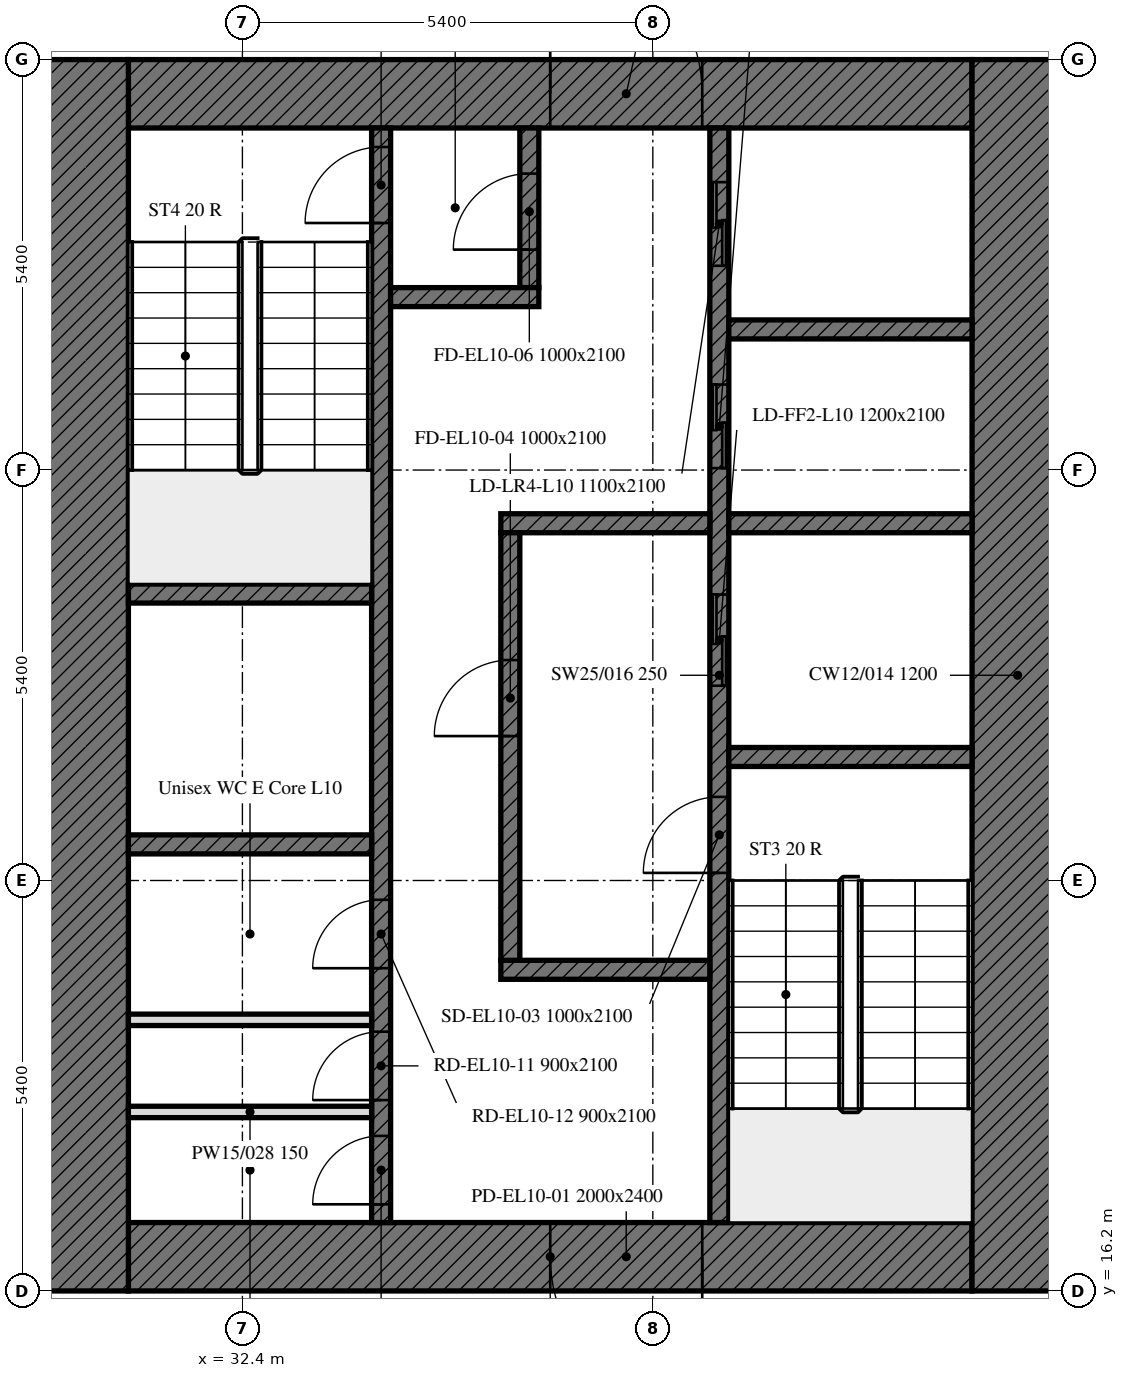
"""IFC4 building model, lengths in metres.
Left out: names, types, materials, properties, quantities, classifications, styles, units other than length and angle.
Written with IfcOpenShell. Run it as: python <this file> out.ifc"""

import sys

from ifc_helpers import new_model, si_unit, direction, frame, frame_2d, origin, place, context, subcontext, project, spatial, rectangle, extrude, element, fill, save


model = new_model("IFC4")
c1 = context("Model", 3, precision=1e-05, world=origin(), true_north=direction((0.0, 1.0)))
c2 = subcontext(c1, "Body", "Model", "MODEL_VIEW")
j1 = project(units=[si_unit("LENGTHUNIT", "METRE"), si_unit("PLANEANGLEUNIT", "RADIAN")], contexts=[c1])
p1 = place(None, origin())
s1 = spatial("IfcSite", under=j1, at=p1, CompositionType="ELEMENT")
p2 = place(p1, origin())
s2 = spatial("IfcBuilding", under=s1, at=p2, CompositionType="ELEMENT")
p3 = place(p2, frame((0.0, 0.0, 48.8)))
s3 = spatial("IfcBuildingStorey", under=s2, at=p3, CompositionType="ELEMENT", Elevation=48.8)
p4 = place(p3, frame((42.0, 16.65, 0.0), z_axis=(0.0, 0.0, 1.0), x_axis=(-1.0, 0.0, 0.0)))
e1 = element("IfcWall", 1, at=p4, inside=s3, PredefinedType="SOLIDWALL", context=c2, shape_type="SweptSolid", body=[
    extrude(rectangle(XDim=11.1, YDim=0.9, at=frame_2d((5.55, 0.0))), origin(), (0.0, 0.0, 1.0), 3.5),
])
p5 = place(p4, frame((3.55, 0.0, 0.0)))
e2 = element("IfcOpeningElement", 2, at=p5, cuts=e1, PredefinedType="OPENING", context=c2, shape_type="SweptSolid", body=[
    extrude(rectangle(XDim=2.0, YDim=2.4, at=frame_2d((1.0, 1.2))), frame((0.0, 0.45, 0.0), z_axis=(0.0, -1.0, 0.0), x_axis=(1.0, 0.0, 0.0)), (0.0, 0.0, 1.0), 0.9),
])
p6 = place(p3, frame((30.9, 31.95, 0.0), z_axis=(0.0, 0.0, 1.0), x_axis=(1.0, 0.0, 0.0)))
e3 = element("IfcWall", 3, at=p6, inside=s3, PredefinedType="SOLIDWALL", context=c2, shape_type="SweptSolid", body=[
    extrude(rectangle(XDim=11.1, YDim=0.9, at=frame_2d((5.55, 0.0))), origin(), (0.0, 0.0, 1.0), 3.5),
])
p7 = place(p6, frame((5.55, 0.0, 0.0)))
e4 = element("IfcOpeningElement", 4, at=p7, cuts=e3, PredefinedType="OPENING", context=c2, shape_type="SweptSolid", body=[
    extrude(rectangle(XDim=2.0, YDim=2.4, at=frame_2d((1.0, 1.2))), frame((0.0, 0.45, 0.0), z_axis=(0.0, -1.0, 0.0), x_axis=(1.0, 0.0, 0.0)), (0.0, 0.0, 1.0), 0.9),
])
for number, where, z_axis, x_axis in (
    (5, (42.6, 32.4, 0.0), (0.0, 0.0, 1.0), (0.0, -1.0, 0.0)),
    (6, (30.3, 16.2, 0.0), (0.0, 0.0, 1.0), (0.0, 1.0, 0.0)),
):
    element("IfcWall", number, at=place(p3, frame(where, z_axis=z_axis, x_axis=x_axis)), inside=s3, PredefinedType="SOLIDWALL", context=c2, shape_type="SweptSolid", body=[
        extrude(rectangle(XDim=16.2, YDim=1.2, at=frame_2d((8.1, 0.0))), origin(), (0.0, 0.0, 1.0), 3.5),
    ])
p8 = place(p3, frame((38.675, 17.1, 0.0), z_axis=(0.0, 0.0, 1.0), x_axis=(0.0, 1.0, 0.0)))
e7 = element("IfcWall", 7, at=p8, inside=s3, PredefinedType="SOLIDWALL", context=c2, shape_type="SweptSolid", body=[
    extrude(rectangle(XDim=14.4, YDim=0.25, at=frame_2d((7.2, 0.0))), origin(), (0.0, 0.0, 1.0), 3.5),
])
p9 = place(p8, frame((4.6, 0.0, 0.0)))
e8 = element("IfcOpeningElement", 8, at=p9, cuts=e7, PredefinedType="OPENING", context=c2, shape_type="SweptSolid", body=[
    extrude(rectangle(XDim=1.0, YDim=2.1, at=frame_2d((0.5, 1.05))), frame((0.0, 0.125, 0.0), z_axis=(0.0, -1.0, 0.0), x_axis=(1.0, 0.0, 0.0)), (0.0, 0.0, 1.0), 0.25),
])
p10 = place(p8, frame((7.062, 0.0, 0.0)))
e9 = element("IfcOpeningElement", 9, at=p10, cuts=e7, PredefinedType="OPENING", context=c2, shape_type="SweptSolid", body=[
    extrude(rectangle(XDim=1.2, YDim=2.1, at=frame_2d((0.6, 1.05))), frame((0.0, 0.125, 0.0), z_axis=(0.0, -1.0, 0.0), x_axis=(1.0, 0.0, 0.0)), (0.0, 0.0, 1.0), 0.25),
])
p11 = place(p8, frame((9.925, 0.0, 0.0)))
e10 = element("IfcOpeningElement", 10, at=p11, cuts=e7, PredefinedType="OPENING", context=c2, shape_type="SweptSolid", body=[
    extrude(rectangle(XDim=1.1, YDim=2.1, at=frame_2d((0.55, 1.05))), frame((0.0, 0.125, 0.0), z_axis=(0.0, -1.0, 0.0), x_axis=(1.0, 0.0, 0.0)), (0.0, 0.0, 1.0), 0.25),
])
p12 = place(p8, frame((12.587, 0.0, 0.0)))
e11 = element("IfcOpeningElement", 11, at=p12, cuts=e7, PredefinedType="OPENING", context=c2, shape_type="SweptSolid", body=[
    extrude(rectangle(XDim=1.1, YDim=2.1, at=frame_2d((0.55, 1.05))), frame((0.0, 0.125, 0.0), z_axis=(0.0, -1.0, 0.0), x_axis=(1.0, 0.0, 0.0)), (0.0, 0.0, 1.0), 0.25),
])
p13 = place(p3, frame((34.225, 17.1, 0.0), z_axis=(0.0, 0.0, 1.0), x_axis=(0.0, 1.0, 0.0)))
e12 = element("IfcWall", 12, at=p13, inside=s3, PredefinedType="SOLIDWALL", context=c2, shape_type="SweptSolid", body=[
    extrude(rectangle(XDim=14.4, YDim=0.25, at=frame_2d((7.2, 0.0))), origin(), (0.0, 0.0, 1.0), 3.5),
])
p14 = place(p13, frame((13.15, 0.0, 0.0)))
e13 = element("IfcOpeningElement", 13, at=p14, cuts=e12, PredefinedType="OPENING", context=c2, shape_type="SweptSolid", body=[
    extrude(rectangle(XDim=1.0, YDim=2.1, at=frame_2d((0.5, 1.05))), frame((0.0, 0.125, 0.0), z_axis=(0.0, -1.0, 0.0), x_axis=(1.0, 0.0, 0.0)), (0.0, 0.0, 1.0), 0.25),
])
p15 = place(p13, frame((0.24, 0.0, 0.0)))
e14 = element("IfcOpeningElement", 14, at=p15, cuts=e12, PredefinedType="OPENING", context=c2, shape_type="SweptSolid", body=[
    extrude(rectangle(XDim=0.9, YDim=2.1, at=frame_2d((0.45, 1.05))), frame((0.0, 0.125, 0.0), z_axis=(0.0, -1.0, 0.0), x_axis=(1.0, 0.0, 0.0)), (0.0, 0.0, 1.0), 0.25),
])
p16 = place(p13, frame((1.611, 0.0, 0.0)))
e15 = element("IfcOpeningElement", 15, at=p16, cuts=e12, PredefinedType="OPENING", context=c2, shape_type="SweptSolid", body=[
    extrude(rectangle(XDim=0.9, YDim=2.1, at=frame_2d((0.45, 1.05))), frame((0.0, 0.125, 0.0), z_axis=(0.0, -1.0, 0.0), x_axis=(1.0, 0.0, 0.0)), (0.0, 0.0, 1.0), 0.25),
])
p17 = place(p13, frame((3.346, 0.0, 0.0)))
e16 = element("IfcOpeningElement", 16, at=p17, cuts=e12, PredefinedType="OPENING", context=c2, shape_type="SweptSolid", body=[
    extrude(rectangle(XDim=0.9, YDim=2.1, at=frame_2d((0.45, 1.05))), frame((0.0, 0.125, 0.0), z_axis=(0.0, -1.0, 0.0), x_axis=(1.0, 0.0, 0.0)), (0.0, 0.0, 1.0), 0.25),
])
p18 = place(p3, frame((38.8, 23.225, 0.0), z_axis=(0.0, 0.0, 1.0), x_axis=(1.0, 0.0, 0.0)))
e17 = element("IfcWall", 17, at=p18, inside=s3, PredefinedType="SOLIDWALL", context=c2, shape_type="SweptSolid", body=[
    extrude(rectangle(XDim=3.2, YDim=0.25, at=frame_2d((1.6, 0.0))), origin(), (0.0, 0.0, 1.0), 3.5),
])
for number, where, z_axis, x_axis in (
    (18, (30.9, 25.375, 0.0), (0.0, 0.0, 1.0), (1.0, 0.0, 0.0)),
    (19, (30.9, 22.075, 0.0), (0.0, 0.0, 1.0), (1.0, 0.0, 0.0)),
):
    element("IfcWall", number, at=place(p3, frame(where, z_axis=z_axis, x_axis=x_axis)), inside=s3, PredefinedType="SOLIDWALL", context=c2, shape_type="SweptSolid", body=[
        extrude(rectangle(XDim=3.2, YDim=0.25, at=frame_2d((1.6, 0.0))), origin(), (0.0, 0.0, 1.0), 3.5),
    ])
p19 = place(p3, frame((38.8, 26.3, 0.0), z_axis=(0.0, 0.0, 1.0), x_axis=(1.0, 0.0, 0.0)))
e20 = element("IfcWall", 20, at=p19, inside=s3, PredefinedType="SOLIDWALL", context=c2, shape_type="SweptSolid", body=[
    extrude(rectangle(XDim=3.2, YDim=0.25, at=frame_2d((1.6, 0.0))), origin(), (0.0, 0.0, 1.0), 3.5),
])
for number, where, z_axis, x_axis in (
    (21, (35.8, 26.3, 0.0), (0.0, 0.0, 1.0), (1.0, 0.0, 0.0)),
    (22, (35.8, 20.425, 0.0), (0.0, 0.0, 1.0), (1.0, 0.0, 0.0)),
):
    element("IfcWall", number, at=place(p3, frame(where, z_axis=z_axis, x_axis=x_axis)), inside=s3, PredefinedType="SOLIDWALL", context=c2, shape_type="SweptSolid", body=[
        extrude(rectangle(XDim=2.75, YDim=0.25, at=frame_2d((1.375, 0.0))), origin(), (0.0, 0.0, 1.0), 3.5),
    ])
p20 = place(p3, frame((36.175, 29.4, 0.0), z_axis=(0.0, 0.0, 1.0), x_axis=(0.0, 1.0, 0.0)))
e23 = element("IfcWall", 23, at=p20, inside=s3, PredefinedType="SOLIDWALL", context=c2, shape_type="SweptSolid", body=[
    extrude(rectangle(XDim=2.1, YDim=0.25, at=frame_2d((1.05, 0.0))), origin(), (0.0, 0.0, 1.0), 3.5),
])
p21 = place(p20, frame((0.5, 0.0, 0.0)))
e24 = element("IfcOpeningElement", 24, at=p21, cuts=e23, PredefinedType="OPENING", context=c2, shape_type="SweptSolid", body=[
    extrude(rectangle(XDim=1.0, YDim=2.1, at=frame_2d((0.5, 1.05))), frame((0.0, 0.125, 0.0), z_axis=(0.0, -1.0, 0.0), x_axis=(1.0, 0.0, 0.0)), (0.0, 0.0, 1.0), 0.25),
])
p22 = place(p3, frame((34.35, 29.275, 0.0), z_axis=(0.0, 0.0, 1.0), x_axis=(1.0, 0.0, 0.0)))
e25 = element("IfcWall", 25, at=p22, inside=s3, PredefinedType="SOLIDWALL", context=c2, shape_type="SweptSolid", body=[
    extrude(rectangle(XDim=1.95, YDim=0.25, at=frame_2d((0.975, 0.0))), origin(), (0.0, 0.0, 1.0), 3.5),
])
p23 = place(p3, frame((35.925, 20.55, 0.0), z_axis=(0.0, 0.0, 1.0), x_axis=(0.0, 1.0, 0.0)))
e26 = element("IfcWall", 26, at=p23, inside=s3, PredefinedType="SOLIDWALL", context=c2, shape_type="SweptSolid", body=[
    extrude(rectangle(XDim=5.625, YDim=0.25, at=frame_2d((2.812, 0.0))), origin(), (0.0, 0.0, 1.0), 3.5),
])
p24 = place(p23, frame((2.95, 0.0, 0.0)))
e27 = element("IfcOpeningElement", 27, at=p24, cuts=e26, PredefinedType="OPENING", context=c2, shape_type="SweptSolid", body=[
    extrude(rectangle(XDim=1.0, YDim=2.1, at=frame_2d((0.5, 1.05))), frame((0.0, 0.125, 0.0), z_axis=(0.0, -1.0, 0.0), x_axis=(1.0, 0.0, 0.0)), (0.0, 0.0, 1.0), 0.25),
])
p25 = place(p3, frame((38.8, 28.85, 0.0), z_axis=(0.0, 0.0, 1.0), x_axis=(1.0, 0.0, 0.0)))
e28 = element("IfcWall", 28, at=p25, inside=s3, PredefinedType="SOLIDWALL", context=c2, shape_type="SweptSolid", body=[
    extrude(rectangle(XDim=3.2, YDim=0.25, at=frame_2d((1.6, 0.0))), origin(), (0.0, 0.0, 1.0), 3.5),
])
for number, where, z_axis, x_axis in (
    (29, (30.9, 18.555, 0.0), (0.0, 0.0, 1.0), (1.0, 0.0, 0.0)),
    (30, (30.9, 19.767, 0.0), (0.0, 0.0, 1.0), (1.0, 0.0, 0.0)),
):
    element("IfcWall", number, at=place(p3, frame(where, z_axis=z_axis, x_axis=x_axis)), inside=s3, PredefinedType="PARTITIONING", context=c2, shape_type="SweptSolid", body=[
        extrude(rectangle(XDim=3.2, YDim=0.15, at=frame_2d((1.6, 0.0))), origin(), (0.0, 0.0, 1.0), 3.5),
    ])
p26 = place(p5, origin())
e31 = element("IfcDoor", 31, at=p26, inside=s3, OperationType="DOUBLE_DOOR_SINGLE_SWING", PredefinedType="DOOR", context=c2, shape_type="SweptSolid", body=[
    extrude(rectangle(XDim=2.0, YDim=2.4, at=frame_2d((1.0, 1.2))), frame((0.0, 0.025, 0.0), z_axis=(0.0, -1.0, 0.0), x_axis=(1.0, 0.0, 0.0)), (0.0, 0.0, 1.0), 0.05),
])
fill(e2, e31)
p27 = place(p7, origin())
e32 = element("IfcDoor", 32, at=p27, inside=s3, OperationType="DOUBLE_DOOR_SINGLE_SWING", PredefinedType="DOOR", context=c2, shape_type="SweptSolid", body=[
    extrude(rectangle(XDim=2.0, YDim=2.4, at=frame_2d((1.0, 1.2))), frame((0.0, 0.025, 0.0), z_axis=(0.0, -1.0, 0.0), x_axis=(1.0, 0.0, 0.0)), (0.0, 0.0, 1.0), 0.05),
])
fill(e4, e32)
p28 = place(p9, origin())
e33 = element("IfcDoor", 33, at=p28, inside=s3, OperationType="SINGLE_SWING_LEFT", PredefinedType="DOOR", context=c2, shape_type="SweptSolid", body=[
    extrude(rectangle(XDim=1.0, YDim=2.1, at=frame_2d((0.5, 1.05))), frame((0.0, 0.025, 0.0), z_axis=(0.0, -1.0, 0.0), x_axis=(1.0, 0.0, 0.0)), (0.0, 0.0, 1.0), 0.05),
])
fill(e8, e33)
p29 = place(p24, origin())
e34 = element("IfcDoor", 34, at=p29, inside=s3, OperationType="SINGLE_SWING_LEFT", PredefinedType="DOOR", context=c2, shape_type="SweptSolid", body=[
    extrude(rectangle(XDim=1.0, YDim=2.1, at=frame_2d((0.5, 1.05))), frame((0.0, 0.025, 0.0), z_axis=(0.0, -1.0, 0.0), x_axis=(1.0, 0.0, 0.0)), (0.0, 0.0, 1.0), 0.05),
])
fill(e27, e34)
p30 = place(p14, origin())
e35 = element("IfcDoor", 35, at=p30, inside=s3, OperationType="SINGLE_SWING_LEFT", PredefinedType="DOOR", context=c2, shape_type="SweptSolid", body=[
    extrude(rectangle(XDim=1.0, YDim=2.1, at=frame_2d((0.5, 1.05))), frame((0.0, 0.025, 0.0), z_axis=(0.0, -1.0, 0.0), x_axis=(1.0, 0.0, 0.0)), (0.0, 0.0, 1.0), 0.05),
])
fill(e13, e35)
p31 = place(p21, origin())
e36 = element("IfcDoor", 36, at=p31, inside=s3, OperationType="SINGLE_SWING_LEFT", PredefinedType="DOOR", context=c2, shape_type="SweptSolid", body=[
    extrude(rectangle(XDim=1.0, YDim=2.1, at=frame_2d((0.5, 1.05))), frame((0.0, 0.025, 0.0), z_axis=(0.0, -1.0, 0.0), x_axis=(1.0, 0.0, 0.0)), (0.0, 0.0, 1.0), 0.05),
])
fill(e24, e36)
p32 = place(p10, origin())
e37 = element("IfcDoor", 37, at=p32, inside=s3, OperationType="DOUBLE_DOOR_SLIDING", PredefinedType="DOOR", context=c2, shape_type="SweptSolid", body=[
    extrude(rectangle(XDim=1.2, YDim=2.1, at=frame_2d((0.6, 1.05))), frame((0.0, 0.025, 0.0), z_axis=(0.0, -1.0, 0.0), x_axis=(1.0, 0.0, 0.0)), (0.0, 0.0, 1.0), 0.05),
])
fill(e9, e37)
p33 = place(p11, origin())
e38 = element("IfcDoor", 38, at=p33, inside=s3, OperationType="DOUBLE_DOOR_SLIDING", PredefinedType="DOOR", context=c2, shape_type="SweptSolid", body=[
    extrude(rectangle(XDim=1.1, YDim=2.1, at=frame_2d((0.55, 1.05))), frame((0.0, 0.025, 0.0), z_axis=(0.0, -1.0, 0.0), x_axis=(1.0, 0.0, 0.0)), (0.0, 0.0, 1.0), 0.05),
])
fill(e10, e38)
p34 = place(p12, origin())
e39 = element("IfcDoor", 39, at=p34, inside=s3, OperationType="DOUBLE_DOOR_SLIDING", PredefinedType="DOOR", context=c2, shape_type="SweptSolid", body=[
    extrude(rectangle(XDim=1.1, YDim=2.1, at=frame_2d((0.55, 1.05))), frame((0.0, 0.025, 0.0), z_axis=(0.0, -1.0, 0.0), x_axis=(1.0, 0.0, 0.0)), (0.0, 0.0, 1.0), 0.05),
])
fill(e11, e39)
p35 = place(p15, origin())
e40 = element("IfcDoor", 40, at=p35, inside=s3, OperationType="SINGLE_SWING_LEFT", PredefinedType="DOOR", context=c2, shape_type="SweptSolid", body=[
    extrude(rectangle(XDim=0.9, YDim=2.1, at=frame_2d((0.45, 1.05))), frame((0.0, 0.025, 0.0), z_axis=(0.0, -1.0, 0.0), x_axis=(1.0, 0.0, 0.0)), (0.0, 0.0, 1.0), 0.05),
])
fill(e14, e40)
p36 = place(p16, origin())
e41 = element("IfcDoor", 41, at=p36, inside=s3, OperationType="SINGLE_SWING_LEFT", PredefinedType="DOOR", context=c2, shape_type="SweptSolid", body=[
    extrude(rectangle(XDim=0.9, YDim=2.1, at=frame_2d((0.45, 1.05))), frame((0.0, 0.025, 0.0), z_axis=(0.0, -1.0, 0.0), x_axis=(1.0, 0.0, 0.0)), (0.0, 0.0, 1.0), 0.05),
])
fill(e15, e41)
p37 = place(p17, origin())
e42 = element("IfcDoor", 42, at=p37, inside=s3, OperationType="SINGLE_SWING_LEFT", PredefinedType="DOOR", context=c2, shape_type="SweptSolid", body=[
    extrude(rectangle(XDim=0.9, YDim=2.1, at=frame_2d((0.45, 1.05))), frame((0.0, 0.025, 0.0), z_axis=(0.0, -1.0, 0.0), x_axis=(1.0, 0.0, 0.0)), (0.0, 0.0, 1.0), 0.05),
])
fill(e16, e42)
save(model, sys.argv[1])
